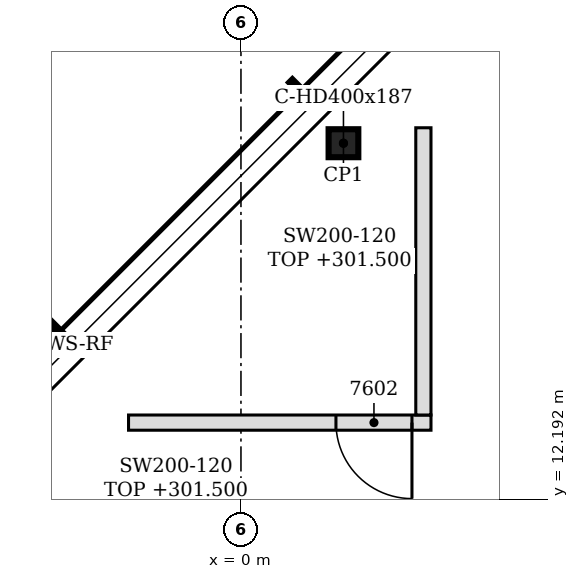
"""IFC4 building model, lengths in metres.
Left out: names, types, materials, properties, quantities, classifications, styles, units other than length and angle.
Written with IfcOpenShell. Run it as: python <this file> out.ifc"""

import sys

from ifc_helpers import new_model, si_unit, direction, frame, frame_2d, origin, origin_2d, place, context, subcontext, project, spatial, rectangle, hollow_rectangle, i_section, extrude, element, fill, save


model = new_model("IFC4")
c1 = context("Model", 3, precision=1e-05, world=origin(), true_north=direction((0.0, 1.0)))
c2 = subcontext(c1, "Body", "Model", "MODEL_VIEW")
j1 = project(units=[si_unit("LENGTHUNIT", "METRE"), si_unit("PLANEANGLEUNIT", "RADIAN")], contexts=[c1])
p1 = place(None, origin())
s1 = spatial("IfcSite", under=j1, at=p1, CompositionType="ELEMENT")
p2 = place(p1, origin())
s2 = spatial("IfcBuilding", under=s1, at=p2, CompositionType="ELEMENT")
p3 = place(p2, frame((0.0, 0.0, 295.8)))
s3 = spatial("IfcBuildingStorey", under=s2, at=p3, CompositionType="ELEMENT", Elevation=295.8)
p4 = place(p3, frame((1.348, 16.876, 5.7), z_axis=(0.0, 0.0, 1.0), x_axis=(1.0, 0.0, 0.0)))
e1 = element("IfcColumn", 1, at=p4, inside=s3, PredefinedType="COLUMN", context=c2, shape_type="SweptSolid", body=[
    extrude(hollow_rectangle(XDim=0.3, YDim=0.3, WallThickness=0.016, InnerFilletRadius=0.016, OuterFilletRadius=0.024, at=origin_2d()), origin(), (0.0, 0.0, 1.0), 4.309),
])
p5 = place(p3, frame((1.348, 16.876, -0.2), z_axis=(0.0, 0.0, 1.0), x_axis=(1.0, 0.0, 0.0)))
e2 = element("IfcColumn", 2, at=p5, inside=s3, PredefinedType="COLUMN", context=c2, shape_type="SweptSolid", body=[
    extrude(i_section(OverallWidth=0.391, OverallDepth=0.368, WebThickness=0.015, FlangeThickness=0.024, FilletRadius=0.015, at=origin_2d()), origin(), (0.0, 0.0, 1.0), 5.9),
])
p6 = place(p3, frame((-1.479, 13.2, 0.0), z_axis=(0.0, 0.0, 1.0), x_axis=(1.0, 0.0, 0.0)))
e3 = element("IfcWall", 3, at=p6, inside=s3, PredefinedType="PARTITIONING", context=c2, shape_type="SweptSolid", body=[
    extrude(rectangle(XDim=3.979, YDim=0.2, at=frame_2d((1.99, 0.0))), origin(), (0.0, 0.0, 1.0), 5.7),
])
p7 = place(p6, frame((2.729, 0.0, 0.0)))
e4 = element("IfcOpeningElement", 4, at=p7, cuts=e3, PredefinedType="OPENING", context=c2, shape_type="SweptSolid", body=[
    extrude(rectangle(XDim=1.0, YDim=2.1, at=frame_2d((0.5, 1.05))), frame((0.0, 0.11, 0.0), z_axis=(0.0, -1.0, 0.0), x_axis=(1.0, 0.0, 0.0)), (0.0, 0.0, 1.0), 0.22),
])
p8 = place(p3, frame((2.4, 13.3, 0.0), z_axis=(0.0, 0.0, 1.0), x_axis=(0.0, 1.0, 0.0)))
e5 = element("IfcWall", 5, at=p8, inside=s3, PredefinedType="PARTITIONING", context=c2, shape_type="SweptSolid", body=[
    extrude(rectangle(XDim=3.779, YDim=0.2, at=frame_2d((1.89, 0.0))), origin(), (0.0, 0.0, 1.0), 5.7),
])
p9 = place(p7, frame((1.0, 0.0, 0.0), z_axis=(0.0, 0.0, 1.0), x_axis=(-1.0, 0.0, 0.0)))
e6 = element("IfcDoor", 6, at=p9, inside=s3, OperationType="SINGLE_SWING_LEFT", PredefinedType="DOOR", context=c2, shape_type="SweptSolid", body=[
    extrude(rectangle(XDim=1.0, YDim=2.1, at=frame_2d((0.5, 1.05))), frame((0.0, 0.025, 0.0), z_axis=(0.0, -1.0, 0.0), x_axis=(1.0, 0.0, 0.0)), (0.0, 0.0, 1.0), 0.05),
])
fill(e4, e6)
save(model, sys.argv[1])
